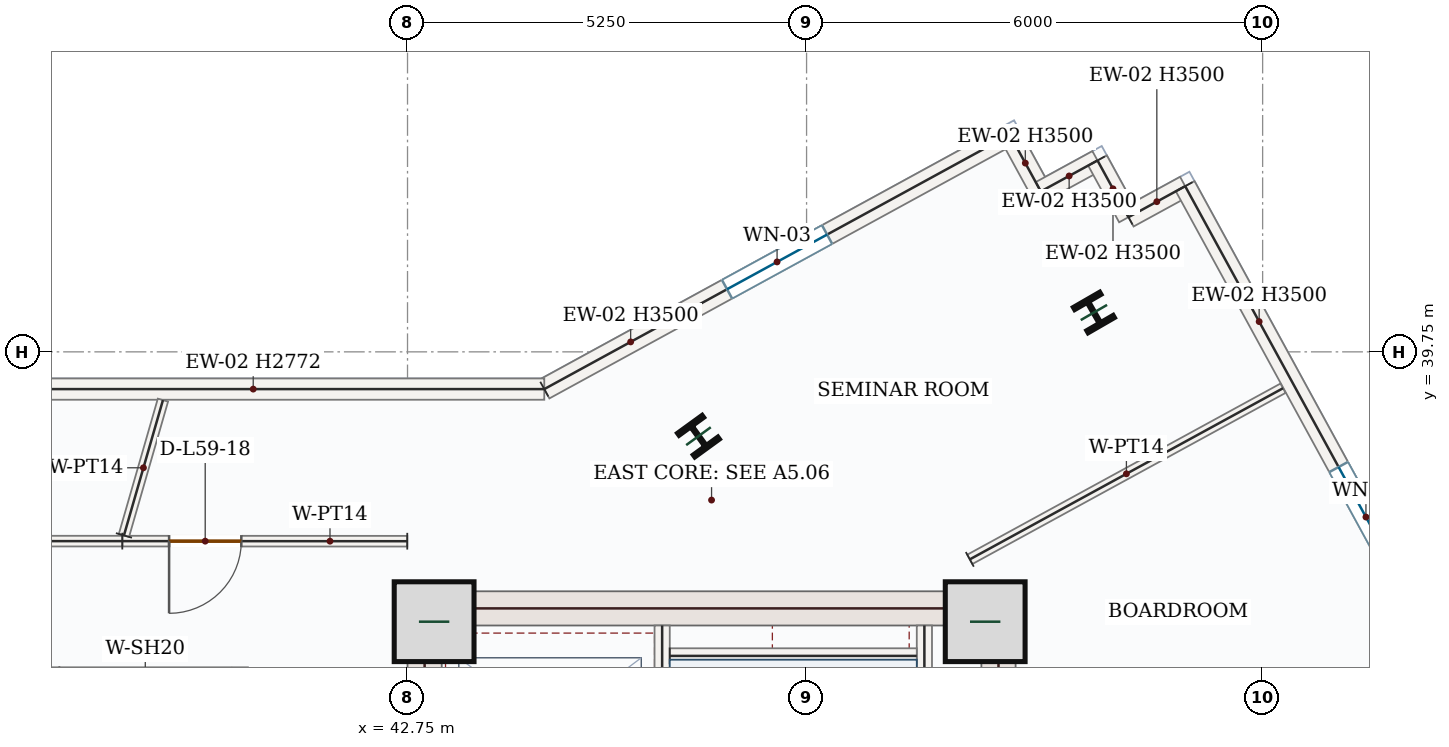
"""IFC4 building model, lengths in metres.
Left out: names, types, materials, properties, quantities, classifications, styles, units other than length and angle.
Written with IfcOpenShell. Run it as: python <this file> out.ifc"""

import sys

from ifc_helpers import new_model, si_unit, direction, frame, frame_2d, origin, origin_2d, place, context, subcontext, project, spatial, rectangle, i_section, extrude, source, transform, mapped, element, fill, save


model = new_model("IFC4")
c1 = context("Model", 3, precision=1e-05, world=origin(), true_north=direction((0.0, 1.0)))
c2 = subcontext(c1, "Body", "Model", "MODEL_VIEW")
j1 = project(units=[si_unit("LENGTHUNIT", "METRE"), si_unit("PLANEANGLEUNIT", "RADIAN")], contexts=[c1])
p1 = place(None, origin())
s1 = spatial("IfcSite", under=j1, at=p1, CompositionType="ELEMENT")
p2 = place(p1, origin())
s2 = spatial("IfcBuilding", under=s1, at=p2, CompositionType="ELEMENT")
p3 = place(p2, frame((0.0, 0.0, 250.35)))
s3 = spatial("IfcBuildingStorey", under=s2, at=p3, CompositionType="ELEMENT", Elevation=250.35)
p4 = place(p3, frame((42.975, 28.05, 0.0), z_axis=(0.0, 0.0, 1.0), x_axis=(0.0, 1.0, 0.0)))
e1 = element("IfcWall", 1, at=p4, inside=s3, PredefinedType="SHEAR", context=c2, shape_type="SweptSolid", body=[
    extrude(rectangle(XDim=8.55, YDim=0.45, at=frame_2d((4.275, 0.0))), origin(), (0.0, 0.0, 1.0), 3.5),
])
p5 = place(p4, frame((1.5, 0.0, 0.0)))
e2 = element("IfcOpeningElement", 2, at=p5, cuts=e1, PredefinedType="OPENING", context=c2, shape_type="SweptSolid", body=[
    extrude(rectangle(XDim=1.1, YDim=2.2, at=frame_2d((0.55, 1.1))), frame((0.0, 0.235, 0.0), z_axis=(0.0, -1.0, 0.0), x_axis=(1.0, 0.0, 0.0)), (0.0, 0.0, 1.0), 0.47),
])
m1 = source(origin(), c2, "Body", "SweptSolid", [
    extrude(rectangle(XDim=8.55, YDim=0.45, at=frame_2d((4.275, 0.0))), origin(), (0.0, 0.0, 1.0), 3.5),
])
p6 = place(p3, frame((50.525, 28.05, 0.0), z_axis=(0.0, 0.0, 1.0), x_axis=(0.0, 1.0, 0.0)))
e3 = element("IfcWall", 3, at=p6, inside=s3, PredefinedType="SHEAR", context=c2, shape_type="MappedRepresentation", body=[
    mapped(m1, transform((0.0, 0.0, 0.0), x_axis=(1.0, 0.0, 0.0), y_axis=(0.0, 1.0, 0.0), z_axis=(0.0, 0.0, 1.0), scale=1.0)),
])
m2 = source(origin(), c2, "Body", "SweptSolid", [
    extrude(rectangle(XDim=7.1, YDim=0.45, at=frame_2d((3.55, 0.0))), origin(), (0.0, 0.0, 1.0), 3.5),
])
p7 = place(p3, frame((43.2, 36.375, 0.0), z_axis=(0.0, 0.0, 1.0), x_axis=(1.0, 0.0, 0.0)))
e4 = element("IfcWall", 4, at=p7, inside=s3, PredefinedType="SHEAR", context=c2, shape_type="MappedRepresentation", body=[
    mapped(m2, transform((0.0, 0.0, 0.0), x_axis=(1.0, 0.0, 0.0), y_axis=(0.0, 1.0, 0.0), z_axis=(0.0, 0.0, 1.0), scale=1.0)),
])
m3 = source(origin(), c2, "Body", "SweptSolid", [
    extrude(rectangle(XDim=1.05, YDim=1.05, at=origin_2d()), origin(), (0.0, 0.0, 1.0), 3.75),
])
for number, where, z_axis, x_axis in (
    (5, (43.1, 36.2, 0.0), (0.0, 0.0, 1.0), (1.0, 0.0, 0.0)),
    (6, (50.35, 36.2, 0.0), (0.0, 0.0, 1.0), (1.0, 0.0, 0.0)),
):
    element("IfcColumn", number, at=place(p3, frame(where, z_axis=z_axis, x_axis=x_axis)), inside=s3, PredefinedType="COLUMN", context=c2, shape_type="MappedRepresentation", body=[
        mapped(m3, transform((0.0, 0.0, 0.0), x_axis=(1.0, 0.0, 0.0), y_axis=(0.0, 1.0, 0.0), z_axis=(0.0, 0.0, 1.0), scale=1.0)),
    ])
m4 = source(origin(), c2, "Body", "SweptSolid", [
    extrude(i_section(OverallWidth=0.399, OverallDepth=0.386, WebThickness=0.021, FlangeThickness=0.033, FilletRadius=0.018, at=origin_2d()), origin(), (0.0, 0.0, 1.0), 3.75),
])
for number, where, z_axis, x_axis in (
    (7, (46.578, 38.641, 0.0), (0.0, 0.0, 1.0), (0.809, 0.588, 0.0)),
    (8, (51.78, 40.268, 0.0), (0.0, 0.0, 1.0), (0.866, 0.5, 0.0)),
):
    element("IfcColumn", number, at=place(p3, frame(where, z_axis=z_axis, x_axis=x_axis)), inside=s3, PredefinedType="COLUMN", context=c2, shape_type="MappedRepresentation", body=[
        mapped(m4, transform((0.0, 0.0, 0.0), x_axis=(1.0, 0.0, 0.0), y_axis=(0.0, 1.0, 0.0), z_axis=(0.0, 0.0, 1.0), scale=1.0)),
    ])
p8 = place(p3, frame((44.549, 39.26, 0.0), z_axis=(0.0, 0.0, 1.0), x_axis=(0.877569176667, 0.479450039279, 0.0)))
e9 = element("IfcWall", 9, at=p8, inside=s3, PredefinedType="SOLIDWALL", context=c2, shape_type="SweptSolid", body=[
    extrude(rectangle(XDim=6.979, YDim=0.28, at=frame_2d((3.49, 0.0))), origin(), (0.0, 0.0, 1.0), 3.5),
])
p9 = place(p8, frame((2.74, 0.0, 0.85)))
e10 = element("IfcOpeningElement", 10, at=p9, cuts=e9, PredefinedType="OPENING", context=c2, shape_type="SweptSolid", body=[
    extrude(rectangle(XDim=1.5, YDim=1.5, at=frame_2d((0.75, 0.75))), frame((0.0, 0.15, 0.0), z_axis=(0.0, -1.0, 0.0), x_axis=(1.0, 0.0, 0.0)), (0.0, 0.0, 1.0), 0.3),
])
m5 = source(origin(), c2, "Body", "SweptSolid", [
    extrude(rectangle(XDim=0.85, YDim=0.28, at=frame_2d((0.425, 0.0))), origin(), (0.0, 0.0, 1.0), 3.5),
])
for number, where, z_axis, x_axis in (
    (11, (50.674, 42.606, 0.0), (0.0, 0.0, 1.0), (0.479, -0.878, 0.0)),
    (12, (51.082, 41.86, 0.0), (0.0, 0.0, 1.0), (0.878, 0.479, 0.0)),
):
    element("IfcWall", number, at=place(p3, frame(where, z_axis=z_axis, x_axis=x_axis)), inside=s3, PredefinedType="SOLIDWALL", context=c2, shape_type="MappedRepresentation", body=[
        mapped(m5, transform((0.0, 0.0, 0.0), x_axis=(1.0, 0.0, 0.0), y_axis=(0.0, 1.0, 0.0), z_axis=(0.0, 0.0, 1.0), scale=1.0)),
    ])
m6 = source(origin(), c2, "Body", "SweptSolid", [
    extrude(rectangle(XDim=0.85, YDim=0.28, at=frame_2d((0.425, 0.0))), origin(), (0.0, 0.0, 1.0), 3.5),
])
p10 = place(p3, frame((51.827, 42.268, 0.0), z_axis=(0.0, 0.0, 1.0), x_axis=(0.479656876283, -0.877456141943, 0.0)))
e13 = element("IfcWall", 13, at=p10, inside=s3, PredefinedType="SOLIDWALL", context=c2, shape_type="MappedRepresentation", body=[
    mapped(m6, transform((0.0, 0.0, 0.0), x_axis=(1.0, 0.0, 0.0), y_axis=(0.0, 1.0, 0.0), z_axis=(0.0, 0.0, 1.0), scale=1.0)),
])
p11 = place(p3, frame((52.235, 41.522, 0.0), z_axis=(0.0, 0.0, 1.0), x_axis=(0.877577015132, 0.479435691737, 0.0)))
e14 = element("IfcWall", 14, at=p11, inside=s3, PredefinedType="SOLIDWALL", context=c2, shape_type="MappedRepresentation", body=[
    mapped(m5, transform((0.0, 0.0, 0.0), x_axis=(1.0, 0.0, 0.0), y_axis=(0.0, 1.0, 0.0), z_axis=(0.0, 0.0, 1.0), scale=1.0)),
])
p12 = place(p3, frame((52.981, 41.929, 0.0), z_axis=(0.0, 0.0, 1.0), x_axis=(0.479472774144, -0.877556755347, 0.0)))
e15 = element("IfcWall", 15, at=p12, inside=s3, PredefinedType="SOLIDWALL", context=c2, shape_type="SweptSolid", body=[
    extrude(rectangle(XDim=9.92, YDim=0.28, at=frame_2d((4.96, 0.0))), origin(), (0.0, 0.0, 1.0), 3.5),
])
p13 = place(p12, frame((4.21, 0.0, 0.85)))
e16 = element("IfcOpeningElement", 16, at=p13, cuts=e15, PredefinedType="OPENING", context=c2, shape_type="SweptSolid", body=[
    extrude(rectangle(XDim=1.5, YDim=1.5, at=frame_2d((0.75, 0.75))), frame((0.0, 0.15, 0.0), z_axis=(0.0, -1.0, 0.0), x_axis=(1.0, 0.0, 0.0)), (0.0, 0.0, 1.0), 0.3),
])
m7 = source(origin(), c2, "Body", "SweptSolid", [
    extrude(rectangle(XDim=7.658, YDim=0.28, at=frame_2d((3.829, 0.0))), origin(), (0.0, 0.0, 1.0), 2.772),
])
p14 = place(p3, frame((36.891, 39.26, 0.0), z_axis=(0.0, 0.0, 1.0), x_axis=(1.0, 0.0, 0.0)))
e17 = element("IfcWall", 17, at=p14, inside=s3, PredefinedType="SOLIDWALL", context=c2, shape_type="MappedRepresentation", body=[
    mapped(m7, transform((0.0, 0.0, 0.0), x_axis=(1.0, 0.0, 0.0), y_axis=(0.0, 1.0, 0.0), z_axis=(0.0, 0.0, 1.0), scale=1.0)),
])
m8 = source(origin(), c2, "Body", "SweptSolid", [
    extrude(rectangle(XDim=7.87, YDim=0.2, at=frame_2d((3.935, 0.0))), origin(), (0.0, 0.0, 1.0), 3.5),
])
p15 = place(p3, frame((49.55, 28.28, 0.0), z_axis=(0.0, 0.0, 1.0), x_axis=(0.0, 1.0, 0.0)))
e18 = element("IfcWall", 18, at=p15, inside=s3, PredefinedType="SOLIDWALL", context=c2, shape_type="MappedRepresentation", body=[
    mapped(m8, transform((0.0, 0.0, 0.0), x_axis=(1.0, 0.0, 0.0), y_axis=(0.0, 1.0, 0.0), z_axis=(0.0, 0.0, 1.0), scale=1.0)),
])
p16 = place(p3, frame((46.1, 28.15, 0.0), z_axis=(0.0, 0.0, 1.0), x_axis=(0.0, 1.0, 0.0)))
e19 = element("IfcWall", 19, at=p16, inside=s3, PredefinedType="SOLIDWALL", context=c2, shape_type="SweptSolid", body=[
    extrude(rectangle(XDim=8.0, YDim=0.2, at=frame_2d((4.0, 0.0))), origin(), (0.0, 0.0, 1.0), 3.5),
])
p17 = place(p16, frame((0.4, 0.0, 0.0)))
e20 = element("IfcOpeningElement", 20, at=p17, cuts=e19, PredefinedType="OPENING", context=c2, shape_type="SweptSolid", body=[
    extrude(rectangle(XDim=1.05, YDim=2.15, at=frame_2d((0.525, 1.075))), frame((0.0, 0.11, 0.0), z_axis=(0.0, -1.0, 0.0), x_axis=(1.0, 0.0, 0.0)), (0.0, 0.0, 1.0), 0.22),
])
m9 = source(origin(), c2, "Body", "SweptSolid", [
    extrude(rectangle(XDim=3.25, YDim=0.2, at=frame_2d((1.625, 0.0))), origin(), (0.0, 0.0, 1.0), 3.5),
])
p18 = place(p3, frame((46.2, 35.75, 0.0), z_axis=(0.0, 0.0, 1.0), x_axis=(1.0, 0.0, 0.0)))
e21 = element("IfcWall", 21, at=p18, inside=s3, PredefinedType="SOLIDWALL", context=c2, shape_type="MappedRepresentation", body=[
    mapped(m9, transform((0.0, 0.0, 0.0), x_axis=(1.0, 0.0, 0.0), y_axis=(0.0, 1.0, 0.0), z_axis=(0.0, 0.0, 1.0), scale=1.0)),
])
m10 = source(origin(), c2, "Body", "SweptSolid", [
    extrude(rectangle(XDim=2.4, YDim=0.2, at=frame_2d((1.2, 0.0))), origin(), (0.0, 0.0, 1.0), 3.5),
])
p19 = place(p3, frame((38.05, 33.2, 0.0), z_axis=(0.0, 0.0, 1.0), x_axis=(0.0, 1.0, 0.0)))
e22 = element("IfcWall", 22, at=p19, inside=s3, PredefinedType="SOLIDWALL", context=c2, shape_type="MappedRepresentation", body=[
    mapped(m10, transform((0.0, 0.0, 0.0), x_axis=(1.0, 0.0, 0.0), y_axis=(0.0, 1.0, 0.0), z_axis=(0.0, 0.0, 1.0), scale=1.0)),
])
p20 = place(p3, frame((40.55, 33.2, 0.0), z_axis=(0.0, 0.0, 1.0), x_axis=(0.0, 1.0, 0.0)))
e23 = element("IfcWall", 23, at=p20, inside=s3, PredefinedType="SOLIDWALL", context=c2, shape_type="SweptSolid", body=[
    extrude(rectangle(XDim=2.4, YDim=0.2, at=frame_2d((1.2, 0.0))), origin(), (0.0, 0.0, 1.0), 3.5),
])
p21 = place(p20, frame((0.65, 0.0, 0.0)))
e24 = element("IfcOpeningElement", 24, at=p21, cuts=e23, PredefinedType="OPENING", context=c2, shape_type="SweptSolid", body=[
    extrude(rectangle(XDim=1.1, YDim=2.15, at=frame_2d((0.55, 1.075))), frame((0.0, 0.11, 0.0), z_axis=(0.0, -1.0, 0.0), x_axis=(1.0, 0.0, 0.0)), (0.0, 0.0, 1.0), 0.22),
])
m11 = source(origin(), c2, "Body", "SweptSolid", [
    extrude(rectangle(XDim=4.695, YDim=0.14, at=frame_2d((2.348, 0.0))), origin(), (0.0, 0.0, 1.0), 3.5),
])
p22 = place(p3, frame((50.148, 37.02, 0.0), z_axis=(0.0, 0.0, 1.0), x_axis=(0.877559526902, 0.479467701461, 0.0)))
e25 = element("IfcWall", 25, at=p22, inside=s3, PredefinedType="PARTITIONING", context=c2, shape_type="MappedRepresentation", body=[
    mapped(m11, transform((0.0, 0.0, 0.0), x_axis=(1.0, 0.0, 0.0), y_axis=(0.0, 1.0, 0.0), z_axis=(0.0, 0.0, 1.0), scale=1.0)),
])
p23 = place(p3, frame((56.109, 35.901, 0.0), z_axis=(0.0, 0.0, 1.0), x_axis=(-0.877574248726, -0.479440755436, 0.0)))
e26 = element("IfcWall", 26, at=p23, inside=s3, PredefinedType="PARTITIONING", context=c2, shape_type="SweptSolid", body=[
    extrude(rectangle(XDim=6.102, YDim=0.14, at=frame_2d((3.051, 0.0))), origin(), (0.0, 0.0, 1.0), 3.5),
])
p24 = place(p23, frame((4.018, 0.0, 0.0)))
e27 = element("IfcOpeningElement", 27, at=p24, cuts=e26, PredefinedType="OPENING", context=c2, shape_type="SweptSolid", body=[
    extrude(rectangle(XDim=0.95, YDim=2.15, at=frame_2d((0.475, 1.075))), frame((0.0, 0.08, 0.0), z_axis=(0.0, -1.0, 0.0), x_axis=(1.0, 0.0, 0.0)), (0.0, 0.0, 1.0), 0.16),
])
p25 = place(p3, frame((42.747, 37.259, 0.0), z_axis=(0.0, 0.0, 1.0), x_axis=(-0.99999994699, 0.000325605609, 0.0)))
e28 = element("IfcWall", 28, at=p25, inside=s3, PredefinedType="PARTITIONING", context=c2, shape_type="SweptSolid", body=[
    extrude(rectangle(XDim=3.749, YDim=0.14, at=frame_2d((1.875, 0.0))), origin(), (0.0, 0.0, 1.0), 3.5),
])
p26 = place(p25, frame((2.183, 0.0, 0.0)))
e29 = element("IfcOpeningElement", 29, at=p26, cuts=e28, PredefinedType="OPENING", context=c2, shape_type="SweptSolid", body=[
    extrude(rectangle(XDim=0.95, YDim=2.15, at=frame_2d((0.475, 1.075))), frame((0.0, 0.08, 0.0), z_axis=(0.0, -1.0, 0.0), x_axis=(1.0, 0.0, 0.0)), (0.0, 0.0, 1.0), 0.16),
])
m12 = source(origin(), c2, "Body", "SweptSolid", [
    extrude(rectangle(XDim=1.853, YDim=0.14, at=frame_2d((0.926, 0.0))), origin(), (0.0, 0.0, 1.0), 3.5),
])
p27 = place(p3, frame((39.019, 37.335, 0.0), z_axis=(0.0, 0.0, 1.0), x_axis=(0.276896245691, 0.960899822626, 0.0)))
e30 = element("IfcWall", 30, at=p27, inside=s3, PredefinedType="PARTITIONING", context=c2, shape_type="MappedRepresentation", body=[
    mapped(m12, transform((0.0, 0.0, 0.0), x_axis=(1.0, 0.0, 0.0), y_axis=(0.0, 1.0, 0.0), z_axis=(0.0, 0.0, 1.0), scale=1.0)),
])
p28 = place(p3, frame((38.998, 37.26, 0.0), z_axis=(0.0, 0.0, 1.0), x_axis=(-1.0, 0.0, 0.0)))
e31 = element("IfcWall", 31, at=p28, inside=s3, PredefinedType="PARTITIONING", context=c2, shape_type="SweptSolid", body=[
    extrude(rectangle(XDim=8.956, YDim=0.14, at=frame_2d((4.478, 0.0))), origin(), (0.0, 0.0, 1.0), 3.5),
])
p29 = place(p28, frame((2.802, 0.0, 0.0)))
e32 = element("IfcOpeningElement", 32, at=p29, cuts=e31, PredefinedType="OPENING", context=c2, shape_type="SweptSolid", body=[
    extrude(rectangle(XDim=0.95, YDim=2.15, at=frame_2d((0.475, 1.075))), frame((0.0, 0.08, 0.0), z_axis=(0.0, -1.0, 0.0), x_axis=(1.0, 0.0, 0.0)), (0.0, 0.0, 1.0), 0.16),
])
m13 = source(origin(), c2, "Body", "SweptSolid", [
    extrude(rectangle(XDim=1.5, YDim=1.5, at=frame_2d((0.75, 0.75))), frame((0.0, 0.03, 0.0), z_axis=(0.0, -1.0, 0.0), x_axis=(1.0, 0.0, 0.0)), (0.0, 0.0, 1.0), 0.06),
])
p30 = place(p9, origin())
e33 = element("IfcWindow", 33, at=p30, inside=s3, PartitioningType="SINGLE_PANEL", PredefinedType="WINDOW", context=c2, shape_type="MappedRepresentation", body=[
    mapped(m13, transform((0.0, 0.0, 0.0), x_axis=(1.0, 0.0, 0.0), y_axis=(0.0, 1.0, 0.0), z_axis=(0.0, 0.0, 1.0), scale=1.0)),
])
fill(e10, e33)
p31 = place(p13, origin())
e34 = element("IfcWindow", 34, at=p31, inside=s3, PartitioningType="SINGLE_PANEL", PredefinedType="WINDOW", context=c2, shape_type="MappedRepresentation", body=[
    mapped(m13, transform((0.0, 0.0, 0.0), x_axis=(1.0, 0.0, 0.0), y_axis=(0.0, 1.0, 0.0), z_axis=(0.0, 0.0, 1.0), scale=1.0)),
])
fill(e16, e34)
m14 = source(origin(), c2, "Body", "SweptSolid", [
    extrude(rectangle(XDim=0.95, YDim=2.15, at=frame_2d((0.475, 1.075))), frame((0.0, 0.025, 0.0), z_axis=(0.0, -1.0, 0.0), x_axis=(1.0, 0.0, 0.0)), (0.0, 0.0, 1.0), 0.05),
])
p32 = place(p26, origin())
e35 = element("IfcDoor", 35, at=p32, inside=s3, OperationType="SINGLE_SWING_RIGHT", PredefinedType="DOOR", context=c2, shape_type="MappedRepresentation", body=[
    mapped(m14, transform((0.0, 0.0, 0.0), x_axis=(1.0, 0.0, 0.0), y_axis=(0.0, 1.0, 0.0), z_axis=(0.0, 0.0, 1.0), scale=1.0)),
])
fill(e29, e35)
save(model, sys.argv[1])
